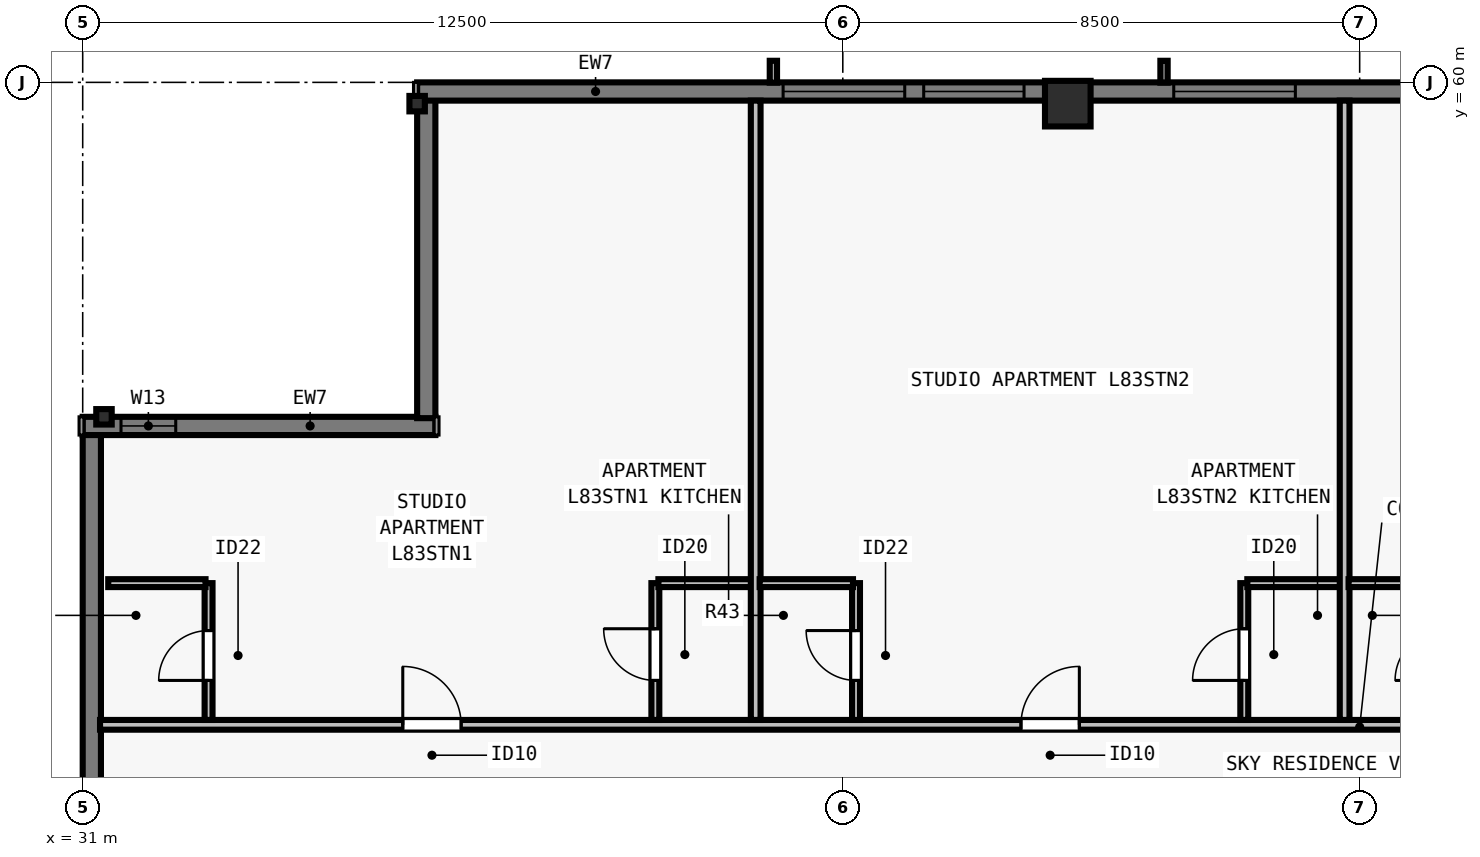
"""IFC4 building model, lengths in metres.
Left out: names, types, materials, properties, quantities, classifications, styles, units other than length and angle.
Written with IfcOpenShell. Run it as: python <this file> out.ifc"""

import sys

from ifc_helpers import new_model, si_unit, direction, frame, frame_2d, origin, origin_2d, place, context, subcontext, project, spatial, rectangle, i_section, extrude, element, fill, save


model = new_model("IFC4")
c1 = context("Model", 3, precision=1e-05, world=origin(), true_north=direction((0.0, 1.0)))
c2 = subcontext(c1, "Body", "Model", "MODEL_VIEW")
j1 = project(units=[si_unit("LENGTHUNIT", "METRE"), si_unit("PLANEANGLEUNIT", "RADIAN")], contexts=[c1])
p1 = place(None, origin())
s1 = spatial("IfcSite", under=j1, at=p1, CompositionType="ELEMENT")
p2 = place(p1, origin())
s2 = spatial("IfcBuilding", under=s1, at=p2, CompositionType="ELEMENT")
p3 = place(p2, frame((0.0, 0.0, 301.5)))
s3 = spatial("IfcBuildingStorey", under=s2, at=p3, CompositionType="ELEMENT", Elevation=301.5)
p4 = place(p3, frame((47.2, 59.65, 0.0), z_axis=(0.0, 0.0, 1.0), x_axis=(1.0, 0.0, 0.0)))
e1 = element("IfcColumn", 1, at=p4, inside=s3, PredefinedType="COLUMN", context=c2, shape_type="SweptSolid", body=[
    extrude(rectangle(XDim=0.75, YDim=0.75, at=origin_2d()), origin(), (0.0, 0.0, 1.0), 3.5),
])
for number, where, z_axis, x_axis in (
    (2, (36.5, 59.65, 0.0), (0.0, 0.0, 1.0), (1.0, 0.0, 0.0)),
    (3, (31.35, 54.5, 0.0), (0.0, 0.0, 1.0), (0.0, 1.0, 0.0)),
):
    element("IfcColumn", number, at=place(p3, frame(where, z_axis=z_axis, x_axis=x_axis)), inside=s3, PredefinedType="COLUMN", context=c2, shape_type="SweptSolid", body=[
        extrude(i_section(OverallWidth=0.254, OverallDepth=0.254, WebThickness=0.009, FlangeThickness=0.014, FilletRadius=0.013, at=origin_2d()), origin(), (0.0, 0.0, 1.0), 3.5),
    ])
p5 = place(p3, frame((31.15, 23.5, 0.0), z_axis=(0.0, 0.0, 1.0), x_axis=(0.0, 1.0, 0.0)))
e4 = element("IfcWall", 4, at=p5, inside=s3, PredefinedType="SOLIDWALL", context=c2, shape_type="SweptSolid", body=[
    extrude(rectangle(XDim=30.722, YDim=0.3, at=frame_2d((15.361, 0.0))), origin(), (0.0, 0.0, 1.0), 3.29),
])
p6 = place(p5, frame((8.331, 0.0, 0.8)))
e5 = element("IfcOpeningElement", 5, at=p6, cuts=e4, PredefinedType="OPENING", context=c2, shape_type="SweptSolid", body=[
    extrude(rectangle(XDim=1.65, YDim=1.758, at=frame_2d((0.825, 0.879))), frame((0.0, 0.16, 0.0), z_axis=(0.0, -1.0, 0.0), x_axis=(1.0, 0.0, 0.0)), (0.0, 0.0, 1.0), 0.32),
])
p7 = place(p5, frame((12.442, 0.0, 0.8)))
e6 = element("IfcOpeningElement", 6, at=p7, cuts=e4, PredefinedType="OPENING", context=c2, shape_type="SweptSolid", body=[
    extrude(rectangle(XDim=2.0, YDim=1.758, at=frame_2d((1.0, 0.879))), frame((0.0, 0.16, 0.0), z_axis=(0.0, -1.0, 0.0), x_axis=(1.0, 0.0, 0.0)), (0.0, 0.0, 1.0), 0.32),
])
p8 = place(p5, frame((16.455, 0.0, 0.8)))
e7 = element("IfcOpeningElement", 7, at=p8, cuts=e4, PredefinedType="OPENING", context=c2, shape_type="SweptSolid", body=[
    extrude(rectangle(XDim=1.65, YDim=1.758, at=frame_2d((0.825, 0.879))), frame((0.0, 0.16, 0.0), z_axis=(0.0, -1.0, 0.0), x_axis=(1.0, 0.0, 0.0)), (0.0, 0.0, 1.0), 0.32),
])
p9 = place(p5, frame((20.967, 0.0, 0.8)))
e8 = element("IfcOpeningElement", 8, at=p9, cuts=e4, PredefinedType="OPENING", context=c2, shape_type="SweptSolid", body=[
    extrude(rectangle(XDim=2.0, YDim=1.758, at=frame_2d((1.0, 0.879))), frame((0.0, 0.16, 0.0), z_axis=(0.0, -1.0, 0.0), x_axis=(1.0, 0.0, 0.0)), (0.0, 0.0, 1.0), 0.32),
])
p10 = place(p3, frame((31.0, 54.35, 0.0), z_axis=(0.0, 0.0, 1.0), x_axis=(1.0, 0.0, 0.0)))
e9 = element("IfcWall", 9, at=p10, inside=s3, PredefinedType="SOLIDWALL", context=c2, shape_type="SweptSolid", body=[
    extrude(rectangle(XDim=5.8, YDim=0.3, at=frame_2d((2.9, 0.0))), origin(), (0.0, 0.0, 1.0), 3.29),
])
p11 = place(p10, frame((0.63, 0.0, 0.8)))
e10 = element("IfcOpeningElement", 10, at=p11, cuts=e9, PredefinedType="OPENING", context=c2, shape_type="SweptSolid", body=[
    extrude(rectangle(XDim=0.9, YDim=1.75, at=frame_2d((0.45, 0.875))), frame((0.0, 0.16, 0.0), z_axis=(0.0, -1.0, 0.0), x_axis=(1.0, 0.0, 0.0)), (0.0, 0.0, 1.0), 0.32),
])
p12 = place(p3, frame((36.65, 54.478, 0.0), z_axis=(0.0, 0.0, 1.0), x_axis=(0.0, 1.0, 0.0)))
e11 = element("IfcWall", 11, at=p12, inside=s3, PredefinedType="SOLIDWALL", context=c2, shape_type="SweptSolid", body=[
    extrude(rectangle(XDim=5.244, YDim=0.3, at=frame_2d((2.622, 0.0))), origin(), (0.0, 0.0, 1.0), 3.29),
])
p13 = place(p3, frame((36.5, 59.85, 0.0), z_axis=(0.0, 0.0, 1.0), x_axis=(1.0, 0.0, 0.0)))
e12 = element("IfcWall", 12, at=p13, inside=s3, PredefinedType="SOLIDWALL", context=c2, shape_type="SweptSolid", body=[
    extrude(rectangle(XDim=30.722, YDim=0.3, at=frame_2d((15.361, 0.0))), origin(), (0.0, 0.0, 1.0), 3.29),
])
p14 = place(p13, frame((6.019, 0.0, 0.8)))
e13 = element("IfcOpeningElement", 13, at=p14, cuts=e12, PredefinedType="OPENING", context=c2, shape_type="SweptSolid", body=[
    extrude(rectangle(XDim=2.0, YDim=1.758, at=frame_2d((1.0, 0.879))), frame((0.0, 0.16, 0.0), z_axis=(0.0, -1.0, 0.0), x_axis=(1.0, 0.0, 0.0)), (0.0, 0.0, 1.0), 0.32),
])
p15 = place(p13, frame((8.331, 0.0, 0.8)))
e14 = element("IfcOpeningElement", 14, at=p15, cuts=e12, PredefinedType="OPENING", context=c2, shape_type="SweptSolid", body=[
    extrude(rectangle(XDim=1.65, YDim=1.758, at=frame_2d((0.825, 0.879))), frame((0.0, 0.16, 0.0), z_axis=(0.0, -1.0, 0.0), x_axis=(1.0, 0.0, 0.0)), (0.0, 0.0, 1.0), 0.32),
])
p16 = place(p13, frame((12.442, 0.0, 0.8)))
e15 = element("IfcOpeningElement", 15, at=p16, cuts=e12, PredefinedType="OPENING", context=c2, shape_type="SweptSolid", body=[
    extrude(rectangle(XDim=2.0, YDim=1.758, at=frame_2d((1.0, 0.879))), frame((0.0, 0.16, 0.0), z_axis=(0.0, -1.0, 0.0), x_axis=(1.0, 0.0, 0.0)), (0.0, 0.0, 1.0), 0.32),
])
p17 = place(p13, frame((16.455, 0.0, 0.8)))
e16 = element("IfcOpeningElement", 16, at=p17, cuts=e12, PredefinedType="OPENING", context=c2, shape_type="SweptSolid", body=[
    extrude(rectangle(XDim=1.65, YDim=1.758, at=frame_2d((0.825, 0.879))), frame((0.0, 0.16, 0.0), z_axis=(0.0, -1.0, 0.0), x_axis=(1.0, 0.0, 0.0)), (0.0, 0.0, 1.0), 0.32),
])
p18 = place(p13, frame((20.967, 0.0, 0.8)))
e17 = element("IfcOpeningElement", 17, at=p18, cuts=e12, PredefinedType="OPENING", context=c2, shape_type="SweptSolid", body=[
    extrude(rectangle(XDim=2.0, YDim=1.758, at=frame_2d((1.0, 0.879))), frame((0.0, 0.16, 0.0), z_axis=(0.0, -1.0, 0.0), x_axis=(1.0, 0.0, 0.0)), (0.0, 0.0, 1.0), 0.32),
])
p19 = place(p13, frame((24.128, 0.0, 0.8)))
e18 = element("IfcOpeningElement", 18, at=p19, cuts=e12, PredefinedType="OPENING", context=c2, shape_type="SweptSolid", body=[
    extrude(rectangle(XDim=1.65, YDim=1.758, at=frame_2d((0.825, 0.879))), frame((0.0, 0.16, 0.0), z_axis=(0.0, -1.0, 0.0), x_axis=(1.0, 0.0, 0.0)), (0.0, 0.0, 1.0), 0.32),
])
p20 = place(p13, frame((26.55, 0.0, 0.8)))
e19 = element("IfcOpeningElement", 19, at=p20, cuts=e12, PredefinedType="OPENING", context=c2, shape_type="SweptSolid", body=[
    extrude(rectangle(XDim=0.9, YDim=1.75, at=frame_2d((0.45, 0.875))), frame((0.0, 0.16, 0.0), z_axis=(0.0, -1.0, 0.0), x_axis=(1.0, 0.0, 0.0)), (0.0, 0.0, 1.0), 0.32),
])
p21 = place(p3, frame((31.285, 49.435, 0.0), z_axis=(0.0, 0.0, 1.0), x_axis=(1.0, 0.0, 0.0)))
e20 = element("IfcWall", 20, at=p21, inside=s3, PredefinedType="PARTITIONING", context=c2, shape_type="SweptSolid", body=[
    extrude(rectangle(XDim=41.43, YDim=0.16, at=frame_2d((20.715, 0.0))), origin(), (0.0, 0.0, 1.0), 3.009),
])
p22 = place(p21, frame((4.979, 0.0, 0.0)))
e21 = element("IfcOpeningElement", 21, at=p22, cuts=e20, PredefinedType="OPENING", context=c2, shape_type="SweptSolid", body=[
    extrude(rectangle(XDim=0.96, YDim=2.18, at=frame_2d((0.48, 1.09))), frame((0.0, 0.09, 0.0), z_axis=(0.0, -1.0, 0.0), x_axis=(1.0, 0.0, 0.0)), (0.0, 0.0, 1.0), 0.18),
])
p23 = place(p21, frame((15.145, 0.0, 0.0)))
e22 = element("IfcOpeningElement", 22, at=p23, cuts=e20, PredefinedType="OPENING", context=c2, shape_type="SweptSolid", body=[
    extrude(rectangle(XDim=0.96, YDim=2.18, at=frame_2d((0.48, 1.09))), frame((0.0, 0.09, 0.0), z_axis=(0.0, -1.0, 0.0), x_axis=(1.0, 0.0, 0.0)), (0.0, 0.0, 1.0), 0.18),
])
p24 = place(p21, frame((25.435, 0.0, 0.0)))
e23 = element("IfcOpeningElement", 23, at=p24, cuts=e20, PredefinedType="OPENING", context=c2, shape_type="SweptSolid", body=[
    extrude(rectangle(XDim=0.96, YDim=2.18, at=frame_2d((0.48, 1.09))), frame((0.0, 0.09, 0.0), z_axis=(0.0, -1.0, 0.0), x_axis=(1.0, 0.0, 0.0)), (0.0, 0.0, 1.0), 0.18),
])
p25 = place(p21, frame((35.849, 0.0, 0.0)))
e24 = element("IfcOpeningElement", 24, at=p25, cuts=e20, PredefinedType="OPENING", context=c2, shape_type="SweptSolid", body=[
    extrude(rectangle(XDim=0.96, YDim=2.18, at=frame_2d((0.48, 1.09))), frame((0.0, 0.09, 0.0), z_axis=(0.0, -1.0, 0.0), x_axis=(1.0, 0.0, 0.0)), (0.0, 0.0, 1.0), 0.18),
])
p26 = place(p3, frame((33.07, 49.515, 0.0), z_axis=(0.0, 0.0, 1.0), x_axis=(0.0, 1.0, 0.0)))
e25 = element("IfcWall", 25, at=p26, inside=s3, PredefinedType="PLUMBINGWALL", context=c2, shape_type="SweptSolid", body=[
    extrude(rectangle(XDim=2.25, YDim=0.13, at=frame_2d((1.125, 0.0))), origin(), (0.0, 0.0, 1.0), 3.29),
])
p27 = place(p26, frame((0.65, 0.0, 0.0)))
e26 = element("IfcOpeningElement", 26, at=p27, cuts=e25, PredefinedType="OPENING", context=c2, shape_type="SweptSolid", body=[
    extrude(rectangle(XDim=0.82, YDim=2.1, at=frame_2d((0.41, 1.05))), frame((0.0, 0.075, 0.0), z_axis=(0.0, -1.0, 0.0), x_axis=(1.0, 0.0, 0.0)), (0.0, 0.0, 1.0), 0.15),
])
p28 = place(p3, frame((31.42, 51.765, 0.0), z_axis=(0.0, 0.0, 1.0), x_axis=(1.0, 0.0, 0.0)))
e27 = element("IfcWall", 27, at=p28, inside=s3, PredefinedType="PLUMBINGWALL", context=c2, shape_type="SweptSolid", body=[
    extrude(rectangle(XDim=1.6, YDim=0.13, at=frame_2d((0.8, 0.0))), origin(), (0.0, 0.0, 1.0), 3.29),
])
p29 = place(p3, frame((40.417, 49.515, 0.0), z_axis=(0.0, 0.0, 1.0), x_axis=(0.0, 1.0, 0.0)))
e28 = element("IfcWall", 28, at=p29, inside=s3, PredefinedType="PLUMBINGWALL", context=c2, shape_type="SweptSolid", body=[
    extrude(rectangle(XDim=2.25, YDim=0.13, at=frame_2d((1.125, 0.0))), origin(), (0.0, 0.0, 1.0), 3.29),
])
p30 = place(p29, frame((0.65, 0.0, 0.0)))
e29 = element("IfcOpeningElement", 29, at=p30, cuts=e28, PredefinedType="OPENING", context=c2, shape_type="SweptSolid", body=[
    extrude(rectangle(XDim=0.85, YDim=2.1, at=frame_2d((0.425, 1.05))), frame((0.0, 0.075, 0.0), z_axis=(0.0, -1.0, 0.0), x_axis=(1.0, 0.0, 0.0)), (0.0, 0.0, 1.0), 0.15),
])
p31 = place(p3, frame((40.468, 51.765, 0.0), z_axis=(0.0, 0.0, 1.0), x_axis=(1.0, 0.0, 0.0)))
e30 = element("IfcWall", 30, at=p31, inside=s3, PredefinedType="PLUMBINGWALL", context=c2, shape_type="SweptSolid", body=[
    extrude(rectangle(XDim=1.6, YDim=0.13, at=frame_2d((0.8, 0.0))), origin(), (0.0, 0.0, 1.0), 3.29),
])
p32 = place(p3, frame((42.067, 49.515, 0.0), z_axis=(0.0, 0.0, 1.0), x_axis=(0.0, 1.0, 0.0)))
e31 = element("IfcWall", 31, at=p32, inside=s3, PredefinedType="PARTITIONING", context=c2, shape_type="SweptSolid", body=[
    extrude(rectangle(XDim=10.185, YDim=0.16, at=frame_2d((5.093, 0.0))), origin(), (0.0, 0.0, 1.0), 2.653),
])
p33 = place(p3, frame((43.718, 49.515, 0.0), z_axis=(0.0, 0.0, 1.0), x_axis=(0.0, 1.0, 0.0)))
e32 = element("IfcWall", 32, at=p33, inside=s3, PredefinedType="PLUMBINGWALL", context=c2, shape_type="SweptSolid", body=[
    extrude(rectangle(XDim=2.25, YDim=0.13, at=frame_2d((1.125, 0.0))), origin(), (0.0, 0.0, 1.0), 3.29),
])
p34 = place(p33, frame((0.65, 0.0, 0.0)))
e33 = element("IfcOpeningElement", 33, at=p34, cuts=e32, PredefinedType="OPENING", context=c2, shape_type="SweptSolid", body=[
    extrude(rectangle(XDim=0.82, YDim=2.1, at=frame_2d((0.41, 1.05))), frame((0.0, 0.075, 0.0), z_axis=(0.0, -1.0, 0.0), x_axis=(1.0, 0.0, 0.0)), (0.0, 0.0, 1.0), 0.15),
])
p35 = place(p3, frame((42.133, 51.765, 0.0), z_axis=(0.0, 0.0, 1.0), x_axis=(1.0, 0.0, 0.0)))
e34 = element("IfcWall", 34, at=p35, inside=s3, PredefinedType="PLUMBINGWALL", context=c2, shape_type="SweptSolid", body=[
    extrude(rectangle(XDim=1.535, YDim=0.13, at=frame_2d((0.768, 0.0))), origin(), (0.0, 0.0, 1.0), 3.29),
])
p36 = place(p3, frame((50.103, 49.515, 0.0), z_axis=(0.0, 0.0, 1.0), x_axis=(0.0, 1.0, 0.0)))
e35 = element("IfcWall", 35, at=p36, inside=s3, PredefinedType="PLUMBINGWALL", context=c2, shape_type="SweptSolid", body=[
    extrude(rectangle(XDim=2.25, YDim=0.13, at=frame_2d((1.125, 0.0))), origin(), (0.0, 0.0, 1.0), 3.009),
])
p37 = place(p36, frame((0.65, 0.0, 0.0)))
e36 = element("IfcOpeningElement", 36, at=p37, cuts=e35, PredefinedType="OPENING", context=c2, shape_type="SweptSolid", body=[
    extrude(rectangle(XDim=0.85, YDim=2.1, at=frame_2d((0.425, 1.05))), frame((0.0, 0.075, 0.0), z_axis=(0.0, -1.0, 0.0), x_axis=(1.0, 0.0, 0.0)), (0.0, 0.0, 1.0), 0.15),
])
p38 = place(p3, frame((50.153, 51.765, 0.0), z_axis=(0.0, 0.0, 1.0), x_axis=(1.0, 0.0, 0.0)))
e37 = element("IfcWall", 37, at=p38, inside=s3, PredefinedType="PLUMBINGWALL", context=c2, shape_type="SweptSolid", body=[
    extrude(rectangle(XDim=1.6, YDim=0.13, at=frame_2d((0.8, 0.0))), origin(), (0.0, 0.0, 1.0), 3.29),
])
p39 = place(p3, frame((51.752, 49.515, 0.0), z_axis=(0.0, 0.0, 1.0), x_axis=(0.0, 1.0, 0.0)))
e38 = element("IfcWall", 38, at=p39, inside=s3, PredefinedType="PARTITIONING", context=c2, shape_type="SweptSolid", body=[
    extrude(rectangle(XDim=10.185, YDim=0.16, at=frame_2d((5.093, 0.0))), origin(), (0.0, 0.0, 1.0), 3.009),
])
p40 = place(p3, frame((51.817, 51.765, 0.0), z_axis=(0.0, 0.0, 1.0), x_axis=(1.0, 0.0, 0.0)))
e39 = element("IfcWall", 39, at=p40, inside=s3, PredefinedType="PLUMBINGWALL", context=c2, shape_type="SweptSolid", body=[
    extrude(rectangle(XDim=1.535, YDim=0.13, at=frame_2d((0.768, 0.0))), origin(), (0.0, 0.0, 1.0), 3.29),
])
p41 = place(p14, origin())
e40 = element("IfcWindow", 40, at=p41, inside=s3, PartitioningType="SINGLE_PANEL", PredefinedType="WINDOW", context=c2, shape_type="SweptSolid", body=[
    extrude(rectangle(XDim=2.0, YDim=1.758, at=frame_2d((1.0, 0.879))), frame((0.0, -0.05, 0.0), z_axis=(0.0, -1.0, 0.0), x_axis=(1.0, 0.0, 0.0)), (0.0, 0.0, 1.0), 0.06),
])
fill(e13, e40)
p42 = place(p15, origin())
e41 = element("IfcWindow", 41, at=p42, inside=s3, PartitioningType="SINGLE_PANEL", PredefinedType="WINDOW", context=c2, shape_type="SweptSolid", body=[
    extrude(rectangle(XDim=1.65, YDim=1.758, at=frame_2d((0.825, 0.879))), frame((0.0, -0.05, 0.0), z_axis=(0.0, -1.0, 0.0), x_axis=(1.0, 0.0, 0.0)), (0.0, 0.0, 1.0), 0.06),
])
fill(e14, e41)
p43 = place(p16, origin())
e42 = element("IfcWindow", 42, at=p43, inside=s3, PartitioningType="SINGLE_PANEL", PredefinedType="WINDOW", context=c2, shape_type="SweptSolid", body=[
    extrude(rectangle(XDim=2.0, YDim=1.758, at=frame_2d((1.0, 0.879))), frame((0.0, -0.05, 0.0), z_axis=(0.0, -1.0, 0.0), x_axis=(1.0, 0.0, 0.0)), (0.0, 0.0, 1.0), 0.06),
])
fill(e15, e42)
p44 = place(p11, origin())
e43 = element("IfcWindow", 43, at=p44, inside=s3, PartitioningType="SINGLE_PANEL", PredefinedType="WINDOW", context=c2, shape_type="SweptSolid", body=[
    extrude(rectangle(XDim=0.9, YDim=1.75, at=frame_2d((0.45, 0.875))), frame((0.0, -0.04, 0.0), z_axis=(0.0, -1.0, 0.0), x_axis=(1.0, 0.0, 0.0)), (0.0, 0.0, 1.0), 0.06),
])
fill(e10, e43)
p45 = place(p27, origin())
e44 = element("IfcDoor", 44, at=p45, inside=s3, OperationType="SINGLE_SWING_LEFT", PredefinedType="DOOR", context=c2, shape_type="SweptSolid", body=[
    extrude(rectangle(XDim=0.82, YDim=2.1, at=frame_2d((0.41, 1.05))), frame((0.0, 0.025, 0.0), z_axis=(0.0, -1.0, 0.0), x_axis=(1.0, 0.0, 0.0)), (0.0, 0.0, 1.0), 0.05),
])
fill(e26, e44)
p46 = place(p30, origin())
e45 = element("IfcDoor", 45, at=p46, inside=s3, OperationType="SINGLE_SWING_RIGHT", PredefinedType="DOOR", context=c2, shape_type="SweptSolid", body=[
    extrude(rectangle(XDim=0.85, YDim=2.1, at=frame_2d((0.425, 1.05))), frame((0.0, 0.025, 0.0), z_axis=(0.0, -1.0, 0.0), x_axis=(1.0, 0.0, 0.0)), (0.0, 0.0, 1.0), 0.05),
])
fill(e29, e45)
p47 = place(p22, origin())
e46 = element("IfcDoor", 46, at=p47, inside=s3, OperationType="SINGLE_SWING_LEFT", PredefinedType="DOOR", context=c2, shape_type="SweptSolid", body=[
    extrude(rectangle(XDim=0.96, YDim=2.18, at=frame_2d((0.48, 1.09))), frame((0.0, 0.025, 0.0), z_axis=(0.0, -1.0, 0.0), x_axis=(1.0, 0.0, 0.0)), (0.0, 0.0, 1.0), 0.05),
])
fill(e21, e46)
p48 = place(p34, origin())
e47 = element("IfcDoor", 47, at=p48, inside=s3, OperationType="SINGLE_SWING_RIGHT", PredefinedType="DOOR", context=c2, shape_type="SweptSolid", body=[
    extrude(rectangle(XDim=0.82, YDim=2.1, at=frame_2d((0.41, 1.05))), frame((0.0, 0.025, 0.0), z_axis=(0.0, -1.0, 0.0), x_axis=(1.0, 0.0, 0.0)), (0.0, 0.0, 1.0), 0.05),
])
fill(e33, e47)
p49 = place(p37, origin())
e48 = element("IfcDoor", 48, at=p49, inside=s3, OperationType="SINGLE_SWING_LEFT", PredefinedType="DOOR", context=c2, shape_type="SweptSolid", body=[
    extrude(rectangle(XDim=0.85, YDim=2.1, at=frame_2d((0.425, 1.05))), frame((0.0, 0.025, 0.0), z_axis=(0.0, -1.0, 0.0), x_axis=(1.0, 0.0, 0.0)), (0.0, 0.0, 1.0), 0.05),
])
fill(e36, e48)
p50 = place(p23, origin())
e49 = element("IfcDoor", 49, at=p50, inside=s3, OperationType="SINGLE_SWING_RIGHT", PredefinedType="DOOR", context=c2, shape_type="SweptSolid", body=[
    extrude(rectangle(XDim=0.96, YDim=2.18, at=frame_2d((0.48, 1.09))), frame((0.0, 0.025, 0.0), z_axis=(0.0, -1.0, 0.0), x_axis=(1.0, 0.0, 0.0)), (0.0, 0.0, 1.0), 0.05),
])
fill(e22, e49)
save(model, sys.argv[1])
